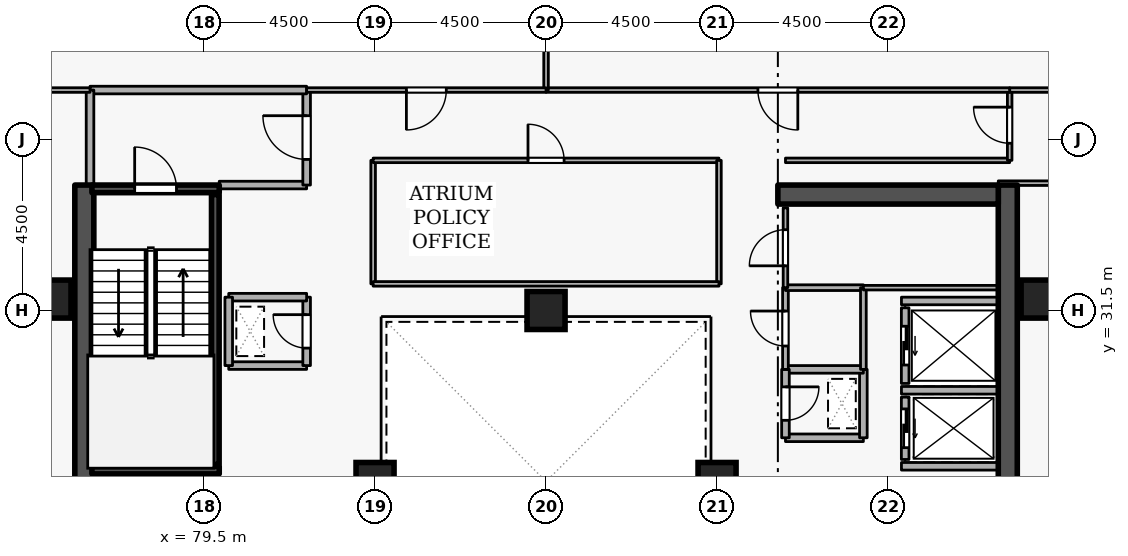
"""IFC4 building model, lengths in metres.
Left out: names, types, materials, properties, quantities, classifications, styles, units other than length and angle.
Written with IfcOpenShell. Run it as: python <this file> out.ifc"""

import sys

from ifc_helpers import new_model, si_unit, direction, frame, frame_2d, origin, origin_2d, place, context, subcontext, project, spatial, rectangle, extrude, element, fill, save


model = new_model("IFC4")
c1 = context("Model", 3, precision=1e-05, world=origin(), true_north=direction((0.0, 1.0)))
c2 = subcontext(c1, "Body", "Model", "MODEL_VIEW")
j1 = project(units=[si_unit("LENGTHUNIT", "METRE"), si_unit("PLANEANGLEUNIT", "RADIAN")], contexts=[c1])
p1 = place(None, origin())
s1 = spatial("IfcSite", under=j1, at=p1, CompositionType="ELEMENT")
p2 = place(p1, origin())
s2 = spatial("IfcBuilding", under=s1, at=p2, CompositionType="ELEMENT")
p3 = place(p2, frame((0.0, 0.0, 200.1)))
s3 = spatial("IfcBuildingStorey", under=s2, at=p3, CompositionType="ELEMENT", Elevation=200.1)
p4 = place(p3, frame((100.65, 19.2, 0.0), z_axis=(0.0, 0.0, 1.0), x_axis=(0.0, 1.0, 0.0)))
e1 = element("IfcWall", 1, at=p4, inside=s3, PredefinedType="SHEAR", context=c2, shape_type="SweptSolid", body=[
    extrude(rectangle(XDim=15.6, YDim=0.5, at=frame_2d((7.8, 0.0))), origin(), (0.0, 0.0, 1.0), 3.6),
])
p5 = place(p3, frame((94.6, 34.55, 0.0), z_axis=(0.0, 0.0, 1.0), x_axis=(1.0, 0.0, 0.0)))
e2 = element("IfcWall", 2, at=p5, inside=s3, PredefinedType="SHEAR", context=c2, shape_type="SweptSolid", body=[
    extrude(rectangle(XDim=5.8, YDim=0.5, at=frame_2d((2.9, 0.0))), origin(), (0.0, 0.0, 1.0), 3.6),
])
p6 = place(p3, frame((76.35, 19.2, 0.0), z_axis=(0.0, 0.0, 1.0), x_axis=(0.0, 1.0, 0.0)))
e3 = element("IfcWall", 3, at=p6, inside=s3, PredefinedType="SHEAR", context=c2, shape_type="SweptSolid", body=[
    extrude(rectangle(XDim=15.6, YDim=0.5, at=frame_2d((7.8, 0.0))), origin(), (0.0, 0.0, 1.0), 3.6),
])
for number, where, z_axis, x_axis in (
    (4, (101.5, 31.8, 0.0), (0.0, 0.0, 1.0), (1.0, 0.0, 0.0)),
    (5, (75.5, 31.8, 0.0), (0.0, 0.0, 1.0), (1.0, 0.0, 0.0)),
    (6, (93.0, 27.0, 0.0), (0.0, 0.0, 1.0), (1.0, 0.0, 0.0)),
    (7, (84.0, 27.0, 0.0), (0.0, 0.0, 1.0), (1.0, 0.0, 0.0)),
    (8, (88.5, 31.5, 0.0), (0.0, 0.0, 1.0), (1.0, 0.0, 0.0)),
):
    element("IfcColumn", number, at=place(p3, frame(where, z_axis=z_axis, x_axis=x_axis)), inside=s3, PredefinedType="COLUMN", context=c2, shape_type="SweptSolid", body=[
        extrude(rectangle(XDim=1.0, YDim=1.0, at=origin_2d()), origin(), (0.0, 0.0, 1.0), 3.6),
    ])
p7 = place(p3, frame((97.95, 29.22, 0.0), z_axis=(0.0, 0.0, 1.0), x_axis=(0.0, -1.0, 0.0)))
e9 = element("IfcWall", 9, at=p7, inside=s3, PredefinedType="STANDARD", context=c2, shape_type="SweptSolid", body=[
    extrude(rectangle(XDim=1.64, YDim=0.2, at=frame_2d((0.82, 0.0))), origin(), (0.0, 0.0, 1.0), 3.32),
])
p8 = place(p7, frame((0.31, 0.0, 0.0)))
e10 = element("IfcOpeningElement", 10, at=p8, cuts=e9, PredefinedType="OPENING", context=c2, shape_type="SweptSolid", body=[
    extrude(rectangle(XDim=1.02, YDim=2.06, at=frame_2d((0.51, 1.03))), frame((0.0, 0.11, 0.0), z_axis=(0.0, -1.0, 0.0), x_axis=(1.0, 0.0, 0.0)), (0.0, 0.0, 1.0), 0.22),
])
p9 = place(p3, frame((97.95, 31.57, 0.0), z_axis=(0.0, 0.0, 1.0), x_axis=(0.0, -1.0, 0.0)))
e11 = element("IfcWall", 11, at=p9, inside=s3, PredefinedType="STANDARD", context=c2, shape_type="SweptSolid", body=[
    extrude(rectangle(XDim=1.99, YDim=0.2, at=frame_2d((0.995, 0.0))), origin(), (0.0, 0.0, 1.0), 3.32),
])
p10 = place(p9, frame((0.485, 0.0, 0.0)))
e12 = element("IfcOpeningElement", 12, at=p10, cuts=e11, PredefinedType="OPENING", context=c2, shape_type="SweptSolid", body=[
    extrude(rectangle(XDim=1.02, YDim=2.06, at=frame_2d((0.51, 1.03))), frame((0.0, 0.11, 0.0), z_axis=(0.0, -1.0, 0.0), x_axis=(1.0, 0.0, 0.0)), (0.0, 0.0, 1.0), 0.22),
])
for number, where, z_axis, x_axis in (
    (13, (97.852, 29.4, 0.0), (0.0, 0.0, 1.0), (1.0, 0.0, 0.0)),
    (14, (97.852, 27.4, 0.0), (0.0, 0.0, 1.0), (1.0, 0.0, 0.0)),
    (15, (97.852, 31.75, 0.0), (0.0, 0.0, 1.0), (1.0, 0.0, 0.0)),
):
    element("IfcWall", number, at=place(p3, frame(where, z_axis=z_axis, x_axis=x_axis)), inside=s3, PredefinedType="STANDARD", context=c2, shape_type="SweptSolid", body=[
        extrude(rectangle(XDim=2.536, YDim=0.2, at=frame_2d((1.268, 0.0))), origin(), (0.0, 0.0, 1.0), 3.32),
    ])
p11 = place(p3, frame((76.55, 34.7, 0.0), z_axis=(0.0, 0.0, 1.0), x_axis=(1.0, 0.0, 0.0)))
e16 = element("IfcWall", 16, at=p11, inside=s3, PredefinedType="SHEAR", context=c2, shape_type="SweptSolid", body=[
    extrude(rectangle(XDim=3.35, YDim=0.2, at=frame_2d((1.675, 0.0))), origin(), (0.0, 0.0, 1.0), 3.6),
])
p12 = place(p11, frame((1.125, 0.0, 0.0)))
e17 = element("IfcOpeningElement", 17, at=p12, cuts=e16, PredefinedType="OPENING", context=c2, shape_type="SweptSolid", body=[
    extrude(rectangle(XDim=1.1, YDim=2.1, at=frame_2d((0.55, 1.05))), frame((0.0, 0.11, 0.0), z_axis=(0.0, -1.0, 0.0), x_axis=(1.0, 0.0, 0.0)), (0.0, 0.0, 1.0), 0.22),
])
p13 = place(p3, frame((79.9, 27.3, 0.0), z_axis=(0.0, 0.0, 1.0), x_axis=(-1.0, 0.0, 0.0)))
e18 = element("IfcWall", 18, at=p13, inside=s3, PredefinedType="SHEAR", context=c2, shape_type="SweptSolid", body=[
    extrude(rectangle(XDim=3.35, YDim=0.2, at=frame_2d((1.675, 0.0))), origin(), (0.0, 0.0, 1.0), 3.6),
])
p14 = place(p3, frame((79.797, 27.45, 0.0), z_axis=(0.0, 0.0, 1.0), x_axis=(0.0, 1.0, 0.0)))
e19 = element("IfcWall", 19, at=p14, inside=s3, PredefinedType="SHEAR", context=c2, shape_type="SweptSolid", body=[
    extrude(rectangle(XDim=7.1, YDim=0.2, at=frame_2d((3.55, 0.0))), origin(), (0.0, 0.0, 1.0), 3.6),
])
p15 = place(p3, frame((79.9, 34.8, 0.0), z_axis=(0.0, 0.0, 1.0), x_axis=(1.0, 0.0, 0.0)))
e20 = element("IfcWall", 20, at=p15, inside=s3, PredefinedType="STANDARD", context=c2, shape_type="SweptSolid", body=[
    extrude(rectangle(XDim=2.3, YDim=0.2, at=frame_2d((1.15, 0.0))), origin(), (0.0, 0.0, 1.0), 2.525),
])
p16 = place(p3, frame((82.2, 34.8, 0.0), z_axis=(0.0, 0.0, 1.0), x_axis=(0.0, 1.0, 0.0)))
e21 = element("IfcWall", 21, at=p16, inside=s3, PredefinedType="STANDARD", context=c2, shape_type="SweptSolid", body=[
    extrude(rectangle(XDim=2.5, YDim=0.2, at=frame_2d((1.25, 0.0))), origin(), (0.0, 0.0, 1.0), 3.32),
])
p17 = place(p16, frame((0.675, 0.0, 0.0)))
e22 = element("IfcOpeningElement", 22, at=p17, cuts=e21, PredefinedType="OPENING", context=c2, shape_type="SweptSolid", body=[
    extrude(rectangle(XDim=1.15, YDim=2.1, at=frame_2d((0.575, 1.05))), frame((0.0, 0.11, 0.0), z_axis=(0.0, -1.0, 0.0), x_axis=(1.0, 0.0, 0.0)), (0.0, 0.0, 1.0), 0.22),
])
p18 = place(p3, frame((82.2, 37.3, 0.0), z_axis=(0.0, 0.0, 1.0), x_axis=(-1.0, 0.0, 0.0)))
e23 = element("IfcWall", 23, at=p18, inside=s3, PredefinedType="STANDARD", context=c2, shape_type="SweptSolid", body=[
    extrude(rectangle(XDim=5.7, YDim=0.2, at=frame_2d((2.85, 0.0))), origin(), (0.0, 0.0, 1.0), 3.32),
])
p19 = place(p3, frame((76.5, 37.3, 0.0), z_axis=(0.0, 0.0, 1.0), x_axis=(0.0, -1.0, 0.0)))
e24 = element("IfcWall", 24, at=p19, inside=s3, PredefinedType="STANDARD", context=c2, shape_type="SweptSolid", body=[
    extrude(rectangle(XDim=2.5, YDim=0.2, at=frame_2d((1.25, 0.0))), origin(), (0.0, 0.0, 1.0), 3.32),
])
p20 = place(p3, frame((94.8, 28.15, 0.0), z_axis=(0.0, 0.0, 1.0), x_axis=(1.0, 0.0, 0.0)))
e25 = element("IfcWall", 25, at=p20, inside=s3, PredefinedType="STANDARD", context=c2, shape_type="SweptSolid", body=[
    extrude(rectangle(XDim=2.05, YDim=0.2, at=frame_2d((1.025, 0.0))), origin(), (0.0, 0.0, 1.0), 3.32),
])
p21 = place(p3, frame((96.85, 28.15, 0.0), z_axis=(0.0, 0.0, 1.0), x_axis=(0.0, 1.0, 0.0)))
e26 = element("IfcWall", 26, at=p21, inside=s3, PredefinedType="STANDARD", context=c2, shape_type="SweptSolid", body=[
    extrude(rectangle(XDim=1.8, YDim=0.2, at=frame_2d((0.9, 0.0))), origin(), (0.0, 0.0, 1.0), 3.32),
])
p22 = place(p3, frame((96.85, 29.95, 0.0), z_axis=(0.0, 0.0, 1.0), x_axis=(-1.0, 0.0, 0.0)))
e27 = element("IfcWall", 27, at=p22, inside=s3, PredefinedType="STANDARD", context=c2, shape_type="SweptSolid", body=[
    extrude(rectangle(XDim=2.05, YDim=0.2, at=frame_2d((1.025, 0.0))), origin(), (0.0, 0.0, 1.0), 3.32),
])
p23 = place(p3, frame((94.8, 29.95, 0.0), z_axis=(0.0, 0.0, 1.0), x_axis=(0.0, -1.0, 0.0)))
e28 = element("IfcWall", 28, at=p23, inside=s3, PredefinedType="STANDARD", context=c2, shape_type="SweptSolid", body=[
    extrude(rectangle(XDim=1.8, YDim=0.2, at=frame_2d((0.9, 0.0))), origin(), (0.0, 0.0, 1.0), 3.32),
])
p24 = place(p23, frame((0.46, 0.0, 0.0)))
e29 = element("IfcOpeningElement", 29, at=p24, cuts=e28, PredefinedType="OPENING", context=c2, shape_type="SweptSolid", body=[
    extrude(rectangle(XDim=0.88, YDim=2.04, at=frame_2d((0.44, 1.02))), frame((0.0, 0.11, 0.0), z_axis=(0.0, -1.0, 0.0), x_axis=(1.0, 0.0, 0.0)), (0.0, 0.0, 1.0), 0.22),
])
p25 = place(p3, frame((80.15, 30.05, 0.0), z_axis=(0.0, 0.0, 1.0), x_axis=(1.0, 0.0, 0.0)))
e30 = element("IfcWall", 30, at=p25, inside=s3, PredefinedType="STANDARD", context=c2, shape_type="SweptSolid", body=[
    extrude(rectangle(XDim=2.05, YDim=0.2, at=frame_2d((1.025, 0.0))), origin(), (0.0, 0.0, 1.0), 3.32),
])
p26 = place(p3, frame((82.2, 30.05, 0.0), z_axis=(0.0, 0.0, 1.0), x_axis=(0.0, 1.0, 0.0)))
e31 = element("IfcWall", 31, at=p26, inside=s3, PredefinedType="STANDARD", context=c2, shape_type="SweptSolid", body=[
    extrude(rectangle(XDim=1.8, YDim=0.2, at=frame_2d((0.9, 0.0))), origin(), (0.0, 0.0, 1.0), 3.32),
])
p27 = place(p26, frame((0.46, 0.0, 0.0)))
e32 = element("IfcOpeningElement", 32, at=p27, cuts=e31, PredefinedType="OPENING", context=c2, shape_type="SweptSolid", body=[
    extrude(rectangle(XDim=0.88, YDim=2.04, at=frame_2d((0.44, 1.02))), frame((0.0, 0.11, 0.0), z_axis=(0.0, -1.0, 0.0), x_axis=(1.0, 0.0, 0.0)), (0.0, 0.0, 1.0), 0.22),
])
p28 = place(p3, frame((82.2, 31.85, 0.0), z_axis=(0.0, 0.0, 1.0), x_axis=(-1.0, 0.0, 0.0)))
e33 = element("IfcWall", 33, at=p28, inside=s3, PredefinedType="STANDARD", context=c2, shape_type="SweptSolid", body=[
    extrude(rectangle(XDim=2.05, YDim=0.2, at=frame_2d((1.025, 0.0))), origin(), (0.0, 0.0, 1.0), 3.32),
])
p29 = place(p3, frame((80.15, 31.85, 0.0), z_axis=(0.0, 0.0, 1.0), x_axis=(0.0, -1.0, 0.0)))
e34 = element("IfcWall", 34, at=p29, inside=s3, PredefinedType="STANDARD", context=c2, shape_type="SweptSolid", body=[
    extrude(rectangle(XDim=1.8, YDim=0.2, at=frame_2d((0.9, 0.0))), origin(), (0.0, 0.0, 1.0), 3.32),
])
p30 = place(p3, frame((94.8, 29.95, 0.0), z_axis=(0.0, 0.0, 1.0), x_axis=(0.0, 1.0, 0.0)))
e35 = element("IfcWall", 35, at=p30, inside=s3, PredefinedType="PARTITIONING", context=c2, shape_type="SweptSolid", body=[
    extrude(rectangle(XDim=2.15, YDim=0.15, at=frame_2d((1.075, 0.0))), origin(), (0.0, 0.0, 1.0), 3.32),
])
p31 = place(p30, frame((0.615, 0.0, 0.0)))
e36 = element("IfcOpeningElement", 36, at=p31, cuts=e35, PredefinedType="OPENING", context=c2, shape_type="SweptSolid", body=[
    extrude(rectangle(XDim=0.92, YDim=2.08, at=frame_2d((0.46, 1.04))), frame((0.0, 0.085, 0.0), z_axis=(0.0, -1.0, 0.0), x_axis=(1.0, 0.0, 0.0)), (0.0, 0.0, 1.0), 0.17),
])
p32 = place(p3, frame((94.8, 32.1, 0.0), z_axis=(0.0, 0.0, 1.0), x_axis=(1.0, 0.0, 0.0)))
e37 = element("IfcWall", 37, at=p32, inside=s3, PredefinedType="PARTITIONING", context=c2, shape_type="SweptSolid", body=[
    extrude(rectangle(XDim=2.05, YDim=0.15, at=frame_2d((1.025, 0.0))), origin(), (0.0, 0.0, 1.0), 3.32),
])
p33 = place(p3, frame((96.85, 32.1, 0.0), z_axis=(0.0, 0.0, 1.0), x_axis=(0.0, -1.0, 0.0)))
e38 = element("IfcWall", 38, at=p33, inside=s3, PredefinedType="PARTITIONING", context=c2, shape_type="SweptSolid", body=[
    extrude(rectangle(XDim=2.15, YDim=0.15, at=frame_2d((1.075, 0.0))), origin(), (0.0, 0.0, 1.0), 3.32),
])
p34 = place(p3, frame((94.8, 32.1, 0.0), z_axis=(0.0, 0.0, 1.0), x_axis=(0.0, 1.0, 0.0)))
e39 = element("IfcWall", 39, at=p34, inside=s3, PredefinedType="PARTITIONING", context=c2, shape_type="SweptSolid", body=[
    extrude(rectangle(XDim=2.1, YDim=0.12, at=frame_2d((1.05, 0.0))), origin(), (0.0, 0.0, 1.0), 3.32),
])
p35 = place(p34, frame((0.575, 0.0, 0.0)))
e40 = element("IfcOpeningElement", 40, at=p35, cuts=e39, PredefinedType="OPENING", context=c2, shape_type="SweptSolid", body=[
    extrude(rectangle(XDim=0.95, YDim=2.1, at=frame_2d((0.475, 1.05))), frame((0.0, 0.07, 0.0), z_axis=(0.0, -1.0, 0.0), x_axis=(1.0, 0.0, 0.0)), (0.0, 0.0, 1.0), 0.14),
])
p36 = place(p3, frame((100.4, 32.1, 0.0), z_axis=(0.0, 0.0, 1.0), x_axis=(-1.0, 0.0, 0.0)))
e41 = element("IfcWall", 41, at=p36, inside=s3, PredefinedType="PARTITIONING", context=c2, shape_type="SweptSolid", body=[
    extrude(rectangle(XDim=3.55, YDim=0.12, at=frame_2d((1.775, 0.0))), origin(), (0.0, 0.0, 1.0), 3.32),
])
p37 = place(p3, frame((94.8, 35.45, 0.0), z_axis=(0.0, 0.0, 1.0), x_axis=(1.0, 0.0, 0.0)))
e42 = element("IfcWall", 42, at=p37, inside=s3, PredefinedType="PARTITIONING", context=c2, shape_type="SweptSolid", body=[
    extrude(rectangle(XDim=5.9, YDim=0.12, at=frame_2d((2.95, 0.0))), origin(), (0.0, 0.0, 1.0), 3.32),
])
p38 = place(p3, frame((100.7, 35.45, 0.0), z_axis=(0.0, 0.0, 1.0), x_axis=(0.0, 1.0, 0.0)))
e43 = element("IfcWall", 43, at=p38, inside=s3, PredefinedType="PARTITIONING", context=c2, shape_type="SweptSolid", body=[
    extrude(rectangle(XDim=1.85, YDim=0.12, at=frame_2d((0.925, 0.0))), origin(), (0.0, 0.0, 1.0), 3.32),
])
p39 = place(p38, frame((0.45, 0.0, 0.0)))
e44 = element("IfcOpeningElement", 44, at=p39, cuts=e43, PredefinedType="OPENING", context=c2, shape_type="SweptSolid", body=[
    extrude(rectangle(XDim=0.95, YDim=2.1, at=frame_2d((0.475, 1.05))), frame((0.0, 0.07, 0.0), z_axis=(0.0, -1.0, 0.0), x_axis=(1.0, 0.0, 0.0)), (0.0, 0.0, 1.0), 0.14),
])
p40 = place(p3, frame((100.7, 37.3, 0.0), z_axis=(0.0, 0.0, 1.0), x_axis=(1.0, 0.0, 0.0)))
e45 = element("IfcWall", 45, at=p40, inside=s3, PredefinedType="PARTITIONING", context=c2, shape_type="SweptSolid", body=[
    extrude(rectangle(XDim=5.52, YDim=0.12, at=frame_2d((2.76, 0.0))), origin(), (0.0, 0.0, 1.0), 3.32),
])
p41 = place(p3, frame((106.22, 34.85, 0.0), z_axis=(0.0, 0.0, 1.0), x_axis=(-1.0, 0.0, 0.0)))
e46 = element("IfcWall", 46, at=p41, inside=s3, PredefinedType="PARTITIONING", context=c2, shape_type="SweptSolid", body=[
    extrude(rectangle(XDim=5.82, YDim=0.12, at=frame_2d((2.91, 0.0))), origin(), (0.0, 0.0, 1.0), 2.525),
])
p42 = place(p3, frame((100.7, 37.3, 0.0), z_axis=(0.0, 0.0, 1.0), x_axis=(-1.0, 0.0, 0.0)))
e47 = element("IfcWall", 47, at=p42, inside=s3, PredefinedType="PARTITIONING", context=c2, shape_type="SweptSolid", body=[
    extrude(rectangle(XDim=12.2, YDim=0.12, at=frame_2d((6.1, 0.0))), origin(), (0.0, 0.0, 1.0), 3.32),
])
p43 = place(p42, frame((5.575, 0.0, 0.0)))
e48 = element("IfcOpeningElement", 48, at=p43, cuts=e47, PredefinedType="OPENING", context=c2, shape_type="SweptSolid", body=[
    extrude(rectangle(XDim=1.05, YDim=2.1, at=frame_2d((0.525, 1.05))), frame((0.0, 0.07, 0.0), z_axis=(0.0, -1.0, 0.0), x_axis=(1.0, 0.0, 0.0)), (0.0, 0.0, 1.0), 0.14),
])
p44 = place(p3, frame((88.5, 37.3, 0.0), z_axis=(0.0, 0.0, 1.0), x_axis=(0.0, 1.0, 0.0)))
e49 = element("IfcWall", 49, at=p44, inside=s3, PredefinedType="PARTITIONING", context=c2, shape_type="SweptSolid", body=[
    extrude(rectangle(XDim=7.42, YDim=0.12, at=frame_2d((3.71, 0.0))), origin(), (0.0, 0.0, 1.0), 2.912),
])
p45 = place(p3, frame((76.5, 37.3, 0.0), z_axis=(0.0, 0.0, 1.0), x_axis=(-1.0, 0.0, 0.0)))
e50 = element("IfcWall", 50, at=p45, inside=s3, PredefinedType="PARTITIONING", context=c2, shape_type="SweptSolid", body=[
    extrude(rectangle(XDim=11.72, YDim=0.12, at=frame_2d((5.86, 0.0))), origin(), (0.0, 0.0, 1.0), 3.32),
])
p46 = place(p3, frame((88.5, 37.3, 0.0), z_axis=(0.0, 0.0, 1.0), x_axis=(-1.0, 0.0, 0.0)))
e51 = element("IfcWall", 51, at=p46, inside=s3, PredefinedType="PARTITIONING", context=c2, shape_type="SweptSolid", body=[
    extrude(rectangle(XDim=6.3, YDim=0.12, at=frame_2d((3.15, 0.0))), origin(), (0.0, 0.0, 1.0), 3.32),
])
p47 = place(p46, frame((2.625, 0.0, 0.0)))
e52 = element("IfcOpeningElement", 52, at=p47, cuts=e51, PredefinedType="OPENING", context=c2, shape_type="SweptSolid", body=[
    extrude(rectangle(XDim=1.05, YDim=2.1, at=frame_2d((0.525, 1.05))), frame((0.0, 0.07, 0.0), z_axis=(0.0, -1.0, 0.0), x_axis=(1.0, 0.0, 0.0)), (0.0, 0.0, 1.0), 0.14),
])
p48 = place(p3, frame((83.95, 32.2, 0.0), z_axis=(0.0, 0.0, 1.0), x_axis=(0.0, 1.0, 0.0)))
e53 = element("IfcWall", 53, at=p48, inside=s3, PredefinedType="PARTITIONING", context=c2, shape_type="SweptSolid", body=[
    extrude(rectangle(XDim=3.25, YDim=0.12, at=frame_2d((1.625, 0.0))), origin(), (0.0, 0.0, 1.0), 3.32),
])
p49 = place(p3, frame((83.95, 35.45, 0.0), z_axis=(0.0, 0.0, 1.0), x_axis=(1.0, 0.0, 0.0)))
e54 = element("IfcWall", 54, at=p49, inside=s3, PredefinedType="PARTITIONING", context=c2, shape_type="SweptSolid", body=[
    extrude(rectangle(XDim=9.1, YDim=0.12, at=frame_2d((4.55, 0.0))), origin(), (0.0, 0.0, 1.0), 3.32),
])
p50 = place(p49, frame((4.075, 0.0, 0.0)))
e55 = element("IfcOpeningElement", 55, at=p50, cuts=e54, PredefinedType="OPENING", context=c2, shape_type="SweptSolid", body=[
    extrude(rectangle(XDim=0.95, YDim=2.1, at=frame_2d((0.475, 1.05))), frame((0.0, 0.07, 0.0), z_axis=(0.0, -1.0, 0.0), x_axis=(1.0, 0.0, 0.0)), (0.0, 0.0, 1.0), 0.14),
])
p51 = place(p3, frame((93.05, 35.45, 0.0), z_axis=(0.0, 0.0, 1.0), x_axis=(0.0, -1.0, 0.0)))
e56 = element("IfcWall", 56, at=p51, inside=s3, PredefinedType="PARTITIONING", context=c2, shape_type="SweptSolid", body=[
    extrude(rectangle(XDim=3.25, YDim=0.12, at=frame_2d((1.625, 0.0))), origin(), (0.0, 0.0, 1.0), 3.32),
])
p52 = place(p3, frame((93.05, 32.2, 0.0), z_axis=(0.0, 0.0, 1.0), x_axis=(-1.0, 0.0, 0.0)))
e57 = element("IfcWall", 57, at=p52, inside=s3, PredefinedType="PARTITIONING", context=c2, shape_type="SweptSolid", body=[
    extrude(rectangle(XDim=9.1, YDim=0.12, at=frame_2d((4.55, 0.0))), origin(), (0.0, 0.0, 1.0), 3.32),
])
p53 = place(p8, origin())
e58 = element("IfcDoor", 58, at=p53, inside=s3, OperationType="SLIDING_TO_LEFT", PredefinedType="DOOR", context=c2, shape_type="SweptSolid", body=[
    extrude(rectangle(XDim=1.02, YDim=2.06, at=frame_2d((0.51, 1.03))), frame((0.0, 0.025, 0.0), z_axis=(0.0, -1.0, 0.0), x_axis=(1.0, 0.0, 0.0)), (0.0, 0.0, 1.0), 0.05),
])
fill(e10, e58)
p54 = place(p10, origin())
e59 = element("IfcDoor", 59, at=p54, inside=s3, OperationType="SLIDING_TO_LEFT", PredefinedType="DOOR", context=c2, shape_type="SweptSolid", body=[
    extrude(rectangle(XDim=1.02, YDim=2.06, at=frame_2d((0.51, 1.03))), frame((0.0, 0.025, 0.0), z_axis=(0.0, -1.0, 0.0), x_axis=(1.0, 0.0, 0.0)), (0.0, 0.0, 1.0), 0.05),
])
fill(e12, e59)
p55 = place(p12, origin())
e60 = element("IfcDoor", 60, at=p55, inside=s3, OperationType="SINGLE_SWING_LEFT", PredefinedType="DOOR", context=c2, shape_type="SweptSolid", body=[
    extrude(rectangle(XDim=1.1, YDim=2.1, at=frame_2d((0.55, 1.05))), frame((0.0, 0.025, 0.0), z_axis=(0.0, -1.0, 0.0), x_axis=(1.0, 0.0, 0.0)), (0.0, 0.0, 1.0), 0.05),
])
fill(e17, e60)
p56 = place(p17, origin())
e61 = element("IfcDoor", 61, at=p56, inside=s3, OperationType="SINGLE_SWING_RIGHT", PredefinedType="DOOR", context=c2, shape_type="SweptSolid", body=[
    extrude(rectangle(XDim=1.15, YDim=2.1, at=frame_2d((0.575, 1.05))), frame((0.0, 0.025, 0.0), z_axis=(0.0, -1.0, 0.0), x_axis=(1.0, 0.0, 0.0)), (0.0, 0.0, 1.0), 0.05),
])
fill(e22, e61)
p57 = place(p24, origin())
e62 = element("IfcDoor", 62, at=p57, inside=s3, OperationType="SINGLE_SWING_LEFT", PredefinedType="DOOR", context=c2, shape_type="SweptSolid", body=[
    extrude(rectangle(XDim=0.88, YDim=2.04, at=frame_2d((0.44, 1.02))), frame((0.0, 0.025, 0.0), z_axis=(0.0, -1.0, 0.0), x_axis=(1.0, 0.0, 0.0)), (0.0, 0.0, 1.0), 0.05),
])
fill(e29, e62)
p58 = place(p27, origin())
e63 = element("IfcDoor", 63, at=p58, inside=s3, OperationType="SINGLE_SWING_RIGHT", PredefinedType="DOOR", context=c2, shape_type="SweptSolid", body=[
    extrude(rectangle(XDim=0.88, YDim=2.04, at=frame_2d((0.44, 1.02))), frame((0.0, 0.025, 0.0), z_axis=(0.0, -1.0, 0.0), x_axis=(1.0, 0.0, 0.0)), (0.0, 0.0, 1.0), 0.05),
])
fill(e32, e63)
p59 = place(p31, origin())
e64 = element("IfcDoor", 64, at=p59, inside=s3, OperationType="SINGLE_SWING_RIGHT", PredefinedType="DOOR", context=c2, shape_type="SweptSolid", body=[
    extrude(rectangle(XDim=0.92, YDim=2.08, at=frame_2d((0.46, 1.04))), frame((0.0, 0.025, 0.0), z_axis=(0.0, -1.0, 0.0), x_axis=(1.0, 0.0, 0.0)), (0.0, 0.0, 1.0), 0.05),
])
fill(e36, e64)
p60 = place(p35, origin())
e65 = element("IfcDoor", 65, at=p60, inside=s3, OperationType="SINGLE_SWING_LEFT", PredefinedType="DOOR", context=c2, shape_type="SweptSolid", body=[
    extrude(rectangle(XDim=0.95, YDim=2.1, at=frame_2d((0.475, 1.05))), frame((0.0, 0.025, 0.0), z_axis=(0.0, -1.0, 0.0), x_axis=(1.0, 0.0, 0.0)), (0.0, 0.0, 1.0), 0.05),
])
fill(e40, e65)
p61 = place(p39, origin())
e66 = element("IfcDoor", 66, at=p61, inside=s3, OperationType="SINGLE_SWING_RIGHT", PredefinedType="DOOR", context=c2, shape_type="SweptSolid", body=[
    extrude(rectangle(XDim=0.95, YDim=2.1, at=frame_2d((0.475, 1.05))), frame((0.0, 0.025, 0.0), z_axis=(0.0, -1.0, 0.0), x_axis=(1.0, 0.0, 0.0)), (0.0, 0.0, 1.0), 0.05),
])
fill(e44, e66)
p62 = place(p43, origin())
e67 = element("IfcDoor", 67, at=p62, inside=s3, OperationType="SINGLE_SWING_LEFT", PredefinedType="DOOR", context=c2, shape_type="SweptSolid", body=[
    extrude(rectangle(XDim=1.05, YDim=2.1, at=frame_2d((0.525, 1.05))), frame((0.0, 0.025, 0.0), z_axis=(0.0, -1.0, 0.0), x_axis=(1.0, 0.0, 0.0)), (0.0, 0.0, 1.0), 0.05),
])
fill(e48, e67)
p63 = place(p47, origin())
e68 = element("IfcDoor", 68, at=p63, inside=s3, OperationType="SINGLE_SWING_RIGHT", PredefinedType="DOOR", context=c2, shape_type="SweptSolid", body=[
    extrude(rectangle(XDim=1.05, YDim=2.1, at=frame_2d((0.525, 1.05))), frame((0.0, 0.025, 0.0), z_axis=(0.0, -1.0, 0.0), x_axis=(1.0, 0.0, 0.0)), (0.0, 0.0, 1.0), 0.05),
])
fill(e52, e68)
p64 = place(p50, origin())
e69 = element("IfcDoor", 69, at=p64, inside=s3, OperationType="SINGLE_SWING_LEFT", PredefinedType="DOOR", context=c2, shape_type="SweptSolid", body=[
    extrude(rectangle(XDim=0.95, YDim=2.1, at=frame_2d((0.475, 1.05))), frame((0.0, 0.025, 0.0), z_axis=(0.0, -1.0, 0.0), x_axis=(1.0, 0.0, 0.0)), (0.0, 0.0, 1.0), 0.05),
])
fill(e55, e69)
save(model, sys.argv[1])
